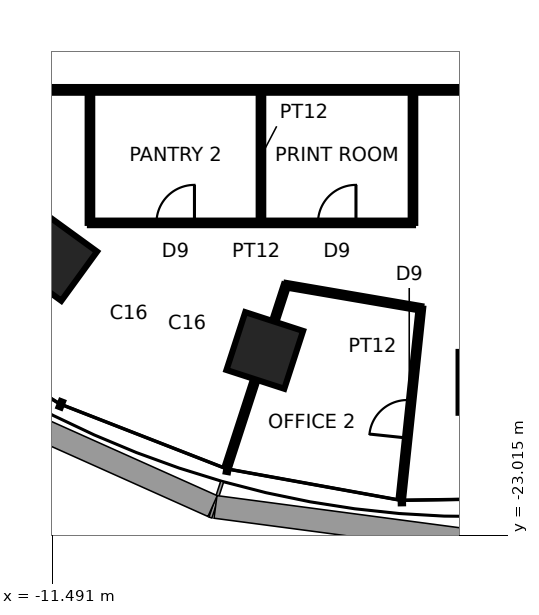
"""IFC4 building model, lengths in metres.
Left out: names, types, materials, properties, quantities, classifications, styles, units other than length and angle.
Written with IfcOpenShell. Run it as: python <this file> out.ifc"""

import sys

from ifc_helpers import new_model, si_unit, direction, frame, frame_2d, origin, origin_2d, place, context, subcontext, project, spatial, rectangle, extrude, element, fill, save


model = new_model("IFC4")
c1 = context("Model", 3, precision=1e-05, world=origin(), true_north=direction((0.0, 1.0)))
c2 = subcontext(c1, "Body", "Model", "MODEL_VIEW")
j1 = project(units=[si_unit("LENGTHUNIT", "METRE"), si_unit("PLANEANGLEUNIT", "RADIAN")], contexts=[c1])
p1 = place(None, origin())
s1 = spatial("IfcSite", under=j1, at=p1, CompositionType="ELEMENT")
p2 = place(p1, origin())
s2 = spatial("IfcBuilding", under=s1, at=p2, CompositionType="ELEMENT")
p3 = place(p2, frame((0.0, 0.0, 108.0)))
s3 = spatial("IfcBuildingStorey", under=s2, at=p3, CompositionType="ELEMENT", Elevation=108.0)
for number, where, z_axis, x_axis in (
    (1, (-11.43, -15.733, 0.0), (0.0, 0.0, 1.0), (-0.588, -0.809, 0.0)),
    (2, (-5.9, -18.157, 0.0), (0.0, 0.0, 1.0), (-0.309, -0.951, 0.0)),
    (3, (0.0, -18.996, 0.0), (0.0, 0.0, 1.0), (0.0, -1.0, 0.0)),
):
    element("IfcColumn", number, at=place(p3, frame(where, z_axis=z_axis, x_axis=x_axis)), inside=s3, PredefinedType="COLUMN", context=c2, shape_type="SweptSolid", body=[
        extrude(rectangle(XDim=1.6, YDim=1.6, at=origin_2d()), origin(), (0.0, 0.0, 1.0), 3.9),
    ])
for number, where, z_axis, x_axis in (
    (4, (-10.5, -11.3, 0.0), (0.0, 0.0, 1.0), (0.0, -1.0, 0.0)),
    (5, (-6.0, -11.3, 0.0), (0.0, 0.0, 1.0), (0.0, -1.0, 0.0)),
):
    element("IfcWall", number, at=place(p3, frame(where, z_axis=z_axis, x_axis=x_axis)), inside=s3, PredefinedType="PARTITIONING", context=c2, shape_type="SweptSolid", body=[
        extrude(rectangle(XDim=3.5, YDim=0.12, at=frame_2d((1.75, 0.0))), origin(), (0.0, 0.0, 1.0), 3.74),
    ])
p4 = place(p3, frame((-10.5, -14.8, 0.0), z_axis=(0.0, 0.0, 1.0), x_axis=(1.0, 0.0, 0.0)))
e6 = element("IfcWall", 6, at=p4, inside=s3, PredefinedType="PARTITIONING", context=c2, shape_type="SweptSolid", body=[
    extrude(rectangle(XDim=8.5, YDim=0.12, at=frame_2d((4.25, 0.0))), origin(), (0.0, 0.0, 1.0), 3.74),
])
p5 = place(p4, frame((1.75, 0.0, 0.0)))
e7 = element("IfcOpeningElement", 7, at=p5, cuts=e6, PredefinedType="OPENING", context=c2, shape_type="SweptSolid", body=[
    extrude(rectangle(XDim=1.0, YDim=2.4, at=frame_2d((0.5, 1.2))), frame((0.0, 0.07, 0.0), z_axis=(0.0, -1.0, 0.0), x_axis=(1.0, 0.0, 0.0)), (0.0, 0.0, 1.0), 0.14),
])
p6 = place(p4, frame((6.0, 0.0, 0.0)))
e8 = element("IfcOpeningElement", 8, at=p6, cuts=e6, PredefinedType="OPENING", context=c2, shape_type="SweptSolid", body=[
    extrude(rectangle(XDim=1.0, YDim=2.4, at=frame_2d((0.5, 1.2))), frame((0.0, 0.07, 0.0), z_axis=(0.0, -1.0, 0.0), x_axis=(1.0, 0.0, 0.0)), (0.0, 0.0, 1.0), 0.14),
])
p7 = place(p3, frame((-5.341, -16.439, 0.0), z_axis=(0.0, 0.0, 1.0), x_axis=(-0.309040803421, -0.951048779938, 0.0)))
e9 = element("IfcWall", 9, at=p7, inside=s3, PredefinedType="PARTITIONING", context=c2, shape_type="SweptSolid", body=[
    extrude(rectangle(XDim=5.0, YDim=0.12, at=frame_2d((2.5, 0.0))), origin(), (0.0, 0.0, 1.0), 2.94),
])
p8 = place(p3, frame((-1.792, -17.048, 0.0), z_axis=(0.0, 0.0, 1.0), x_axis=(-0.985604186085, 0.169069182206, 0.0)))
e10 = element("IfcWall", 10, at=p8, inside=s3, PredefinedType="PARTITIONING", context=c2, shape_type="SweptSolid", body=[
    extrude(rectangle(XDim=3.601, YDim=0.12, at=frame_2d((1.801, 0.0))), origin(), (0.0, 0.0, 1.0), 3.74),
])
p9 = place(p3, frame((-2.0, -14.8, 0.0), z_axis=(0.0, 0.0, 1.0), x_axis=(0.0, 1.0, 0.0)))
e11 = element("IfcWall", 11, at=p9, inside=s3, PredefinedType="PARTITIONING", context=c2, shape_type="SweptSolid", body=[
    extrude(rectangle(XDim=3.5, YDim=0.12, at=frame_2d((1.75, 0.0))), origin(), (0.0, 0.0, 1.0), 3.74),
])
p10 = place(p3, frame((-2.314, -22.021, 0.0), z_axis=(0.0, 0.0, 1.0), x_axis=(0.104539905878, 0.994520692635, 0.0)))
e12 = element("IfcWall", 12, at=p10, inside=s3, PredefinedType="PARTITIONING", context=c2, shape_type="SweptSolid", body=[
    extrude(rectangle(XDim=5.0, YDim=0.12, at=frame_2d((2.5, 0.0))), origin(), (0.0, 0.0, 1.0), 3.74),
])
p11 = place(p10, frame((1.568, 0.0, 0.0)))
e13 = element("IfcOpeningElement", 13, at=p11, cuts=e12, PredefinedType="OPENING", context=c2, shape_type="SweptSolid", body=[
    extrude(rectangle(XDim=1.0, YDim=2.4, at=frame_2d((0.5, 1.2))), frame((0.0, 0.07, 0.0), z_axis=(0.0, -1.0, 0.0), x_axis=(1.0, 0.0, 0.0)), (0.0, 0.0, 1.0), 0.14),
])
p12 = place(p3, frame((-16.0, -11.3, 0.0), z_axis=(0.0, 0.0, 1.0), x_axis=(1.0, 0.0, 0.0)))
e14 = element("IfcWall", 14, at=p12, inside=s3, PredefinedType="PARTITIONING", context=c2, shape_type="SweptSolid", body=[
    extrude(rectangle(XDim=32.0, YDim=0.15, at=frame_2d((16.0, 0.0))), origin(), (0.0, 0.0, 1.0), 3.74),
])
p13 = place(p11, origin())
e15 = element("IfcDoor", 15, at=p13, inside=s3, OperationType="SINGLE_SWING_LEFT", PredefinedType="DOOR", context=c2, shape_type="SweptSolid", body=[
    extrude(rectangle(XDim=1.0, YDim=2.4, at=frame_2d((0.5, 1.2))), frame((0.0, 0.025, 0.0), z_axis=(0.0, -1.0, 0.0), x_axis=(1.0, 0.0, 0.0)), (0.0, 0.0, 1.0), 0.05),
])
fill(e13, e15)
p14 = place(p5, origin())
e16 = element("IfcDoor", 16, at=p14, inside=s3, OperationType="SINGLE_SWING_RIGHT", PredefinedType="DOOR", context=c2, shape_type="SweptSolid", body=[
    extrude(rectangle(XDim=1.0, YDim=2.4, at=frame_2d((0.5, 1.2))), frame((0.0, 0.025, 0.0), z_axis=(0.0, -1.0, 0.0), x_axis=(1.0, 0.0, 0.0)), (0.0, 0.0, 1.0), 0.05),
])
fill(e7, e16)
p15 = place(p6, origin())
e17 = element("IfcDoor", 17, at=p15, inside=s3, OperationType="SINGLE_SWING_RIGHT", PredefinedType="DOOR", context=c2, shape_type="SweptSolid", body=[
    extrude(rectangle(XDim=1.0, YDim=2.4, at=frame_2d((0.5, 1.2))), frame((0.0, 0.025, 0.0), z_axis=(0.0, -1.0, 0.0), x_axis=(1.0, 0.0, 0.0)), (0.0, 0.0, 1.0), 0.05),
])
fill(e8, e17)
save(model, sys.argv[1])
